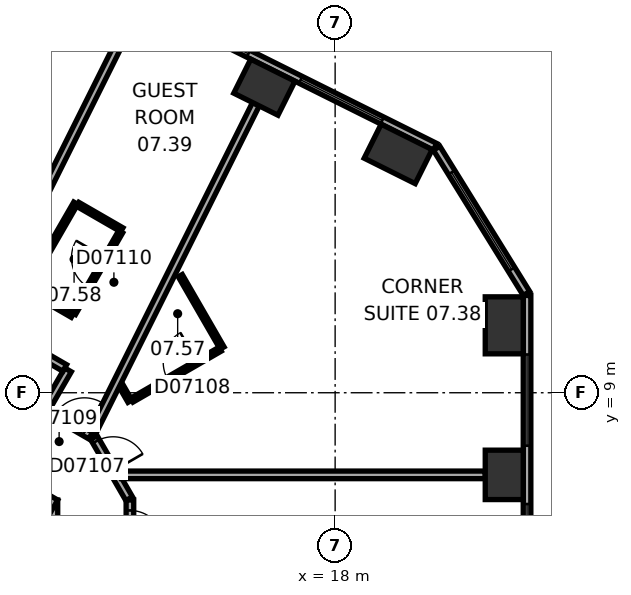
"""IFC4 building model, lengths in metres.
Left out: names, types, materials, properties, quantities, classifications, styles, units other than length and angle.
Written with IfcOpenShell. Run it as: python <this file> out.ifc"""

import sys

from ifc_helpers import new_model, si_unit, direction, frame, frame_2d, origin, origin_2d, place, context, subcontext, project, spatial, rectangle, extrude, element, fill, save


model = new_model("IFC4")
c1 = context("Model", 3, precision=1e-05, world=origin(), true_north=direction((0.0, 1.0)))
c2 = subcontext(c1, "Body", "Model", "MODEL_VIEW")
j1 = project(units=[si_unit("LENGTHUNIT", "METRE"), si_unit("PLANEANGLEUNIT", "RADIAN")], contexts=[c1])
p1 = place(None, origin())
s1 = spatial("IfcSite", under=j1, at=p1, CompositionType="ELEMENT")
p2 = place(p1, origin())
s2 = spatial("IfcBuilding", under=s1, at=p2, CompositionType="ELEMENT")
p3 = place(p2, frame((0.0, 0.0, 44.0)))
s3 = spatial("IfcBuildingStorey", under=s2, at=p3, CompositionType="ELEMENT", Elevation=44.0)
p4 = place(p3, frame((22.45, 6.839, 0.0), z_axis=(0.0, 0.0, 1.0), x_axis=(0.0, 1.0, 0.0)))
e1 = element("IfcColumn", 1, at=p4, inside=s3, PredefinedType="COLUMN", context=c2, shape_type="SweptSolid", body=[
    extrude(rectangle(XDim=1.3, YDim=1.0, at=origin_2d()), origin(), (0.0, 0.0, 1.0), 3.3),
])
for number, where, z_axis, x_axis in (
    (2, (22.45, 10.774, 0.0), (0.0, 0.0, 1.0), (0.0, 1.0, 0.0)),
    (3, (19.659, 15.284, 0.0), (0.0, 0.0, 1.0), (-0.895, 0.446, 0.0)),
):
    element("IfcColumn", number, at=place(p3, frame(where, z_axis=z_axis, x_axis=x_axis)), inside=s3, PredefinedType="COLUMN", context=c2, shape_type="SweptSolid", body=[
        extrude(rectangle(XDim=1.5, YDim=1.0, at=origin_2d()), origin(), (0.0, 0.0, 1.0), 3.3),
    ])
p5 = place(p3, frame((16.138, 17.04, 0.0), z_axis=(0.0, 0.0, 1.0), x_axis=(-0.894934361602, 0.44619781311, 0.0)))
e4 = element("IfcColumn", 4, at=p5, inside=s3, PredefinedType="COLUMN", context=c2, shape_type="SweptSolid", body=[
    extrude(rectangle(XDim=1.3, YDim=1.0, at=origin_2d()), origin(), (0.0, 0.0, 1.0), 3.3),
])
p6 = place(p3, frame((10.1, -6.177, 0.0), z_axis=(0.0, 0.0, 1.0), x_axis=(0.0, 1.0, 0.0)))
e5 = element("IfcWall", 5, at=p6, inside=s3, PredefinedType="SHEAR", context=c2, shape_type="SweptSolid", body=[
    extrude(rectangle(XDim=12.355, YDim=1.2, at=frame_2d((6.177, 0.0))), origin(), (0.0, 0.0, 1.0), 3.3),
])
p7 = place(p6, frame((6.378, 0.0, 0.0)))
e6 = element("IfcOpeningElement", 6, at=p7, cuts=e5, PredefinedType="OPENING", context=c2, shape_type="SweptSolid", body=[
    extrude(rectangle(XDim=1.5, YDim=2.1, at=frame_2d((0.75, 1.05))), frame((0.0, 0.61, 0.0), z_axis=(0.0, -1.0, 0.0), x_axis=(1.0, 0.0, 0.0)), (0.0, 0.0, 1.0), 1.22),
])
p8 = place(p6, frame((1.828, 0.0, 0.0)))
e7 = element("IfcOpeningElement", 7, at=p8, cuts=e5, PredefinedType="OPENING", context=c2, shape_type="SweptSolid", body=[
    extrude(rectangle(XDim=1.1, YDim=2.1, at=frame_2d((0.55, 1.05))), frame((0.0, 0.61, 0.0), z_axis=(0.0, -1.0, 0.0), x_axis=(1.0, 0.0, 0.0)), (0.0, 0.0, 1.0), 1.22),
])
p9 = place(p6, frame((4.427, 0.0, 0.0)))
e8 = element("IfcOpeningElement", 8, at=p9, cuts=e5, PredefinedType="OPENING", context=c2, shape_type="SweptSolid", body=[
    extrude(rectangle(XDim=1.1, YDim=2.1, at=frame_2d((0.55, 1.05))), frame((0.0, 0.61, 0.0), z_axis=(0.0, -1.0, 0.0), x_axis=(1.0, 0.0, 0.0)), (0.0, 0.0, 1.0), 1.22),
])
p10 = place(p3, frame((10.4, 5.658, 0.0), z_axis=(0.0, 0.0, 1.0), x_axis=(-0.866021384402, 0.500006961711, 0.0)))
e9 = element("IfcWall", 9, at=p10, inside=s3, PredefinedType="SHEAR", context=c2, shape_type="SweptSolid", body=[
    extrude(rectangle(XDim=12.355, YDim=1.2, at=frame_2d((6.178, 0.0))), origin(), (0.0, 0.0, 1.0), 3.3),
])
p11 = place(p10, frame((2.728, 0.0, 0.0)))
e10 = element("IfcOpeningElement", 10, at=p11, cuts=e9, PredefinedType="OPENING", context=c2, shape_type="SweptSolid", body=[
    extrude(rectangle(XDim=1.1, YDim=2.1, at=frame_2d((0.55, 1.05))), frame((0.0, 0.61, 0.0), z_axis=(0.0, -1.0, 0.0), x_axis=(1.0, 0.0, 0.0)), (0.0, 0.0, 1.0), 1.22),
])
p12 = place(p10, frame((5.328, 0.0, 0.0)))
e11 = element("IfcOpeningElement", 11, at=p12, cuts=e9, PredefinedType="OPENING", context=c2, shape_type="SweptSolid", body=[
    extrude(rectangle(XDim=1.1, YDim=2.1, at=frame_2d((0.55, 1.05))), frame((0.0, 0.61, 0.0), z_axis=(0.0, -1.0, 0.0), x_axis=(1.0, 0.0, 0.0)), (0.0, 0.0, 1.0), 1.22),
])
p13 = place(p10, frame((7.928, 0.0, 0.0)))
e12 = element("IfcOpeningElement", 12, at=p13, cuts=e9, PredefinedType="OPENING", context=c2, shape_type="SweptSolid", body=[
    extrude(rectangle(XDim=1.1, YDim=2.1, at=frame_2d((0.55, 1.05))), frame((0.0, 0.61, 0.0), z_axis=(0.0, -1.0, 0.0), x_axis=(1.0, 0.0, 0.0)), (0.0, 0.0, 1.0), 1.22),
])
p14 = place(p3, frame((23.05, -9.687, 0.0), z_axis=(0.0, 0.0, 1.0), x_axis=(0.0, 1.0, 0.0)))
e13 = element("IfcWall", 13, at=p14, inside=s3, PredefinedType="STANDARD", context=c2, shape_type="SweptSolid", body=[
    extrude(rectangle(XDim=21.246, YDim=0.2, at=frame_2d((10.623, 0.0))), origin(), (0.0, 0.0, 1.0), 3.3),
])
p15 = place(p14, frame((1.555, 0.0, 0.8)))
e14 = element("IfcOpeningElement", 14, at=p15, cuts=e13, PredefinedType="OPENING", context=c2, shape_type="SweptSolid", body=[
    extrude(rectangle(XDim=2.4, YDim=1.7, at=frame_2d((1.2, 0.85))), frame((0.0, 0.11, 0.0), z_axis=(0.0, -1.0, 0.0), x_axis=(1.0, 0.0, 0.0)), (0.0, 0.0, 1.0), 0.22),
])
p16 = place(p14, frame((5.489, 0.0, 0.8)))
e15 = element("IfcOpeningElement", 15, at=p16, cuts=e13, PredefinedType="OPENING", context=c2, shape_type="SweptSolid", body=[
    extrude(rectangle(XDim=2.4, YDim=1.7, at=frame_2d((1.2, 0.85))), frame((0.0, 0.11, 0.0), z_axis=(0.0, -1.0, 0.0), x_axis=(1.0, 0.0, 0.0)), (0.0, 0.0, 1.0), 0.22),
])
p17 = place(p14, frame((9.424, 0.0, 0.8)))
e16 = element("IfcOpeningElement", 16, at=p17, cuts=e13, PredefinedType="OPENING", context=c2, shape_type="SweptSolid", body=[
    extrude(rectangle(XDim=2.4, YDim=1.7, at=frame_2d((1.2, 0.85))), frame((0.0, 0.11, 0.0), z_axis=(0.0, -1.0, 0.0), x_axis=(1.0, 0.0, 0.0)), (0.0, 0.0, 1.0), 0.22),
])
p18 = place(p14, frame((13.358, 0.0, 0.8)))
e17 = element("IfcOpeningElement", 17, at=p18, cuts=e13, PredefinedType="OPENING", context=c2, shape_type="SweptSolid", body=[
    extrude(rectangle(XDim=2.4, YDim=1.7, at=frame_2d((1.2, 0.85))), frame((0.0, 0.11, 0.0), z_axis=(0.0, -1.0, 0.0), x_axis=(1.0, 0.0, 0.0)), (0.0, 0.0, 1.0), 0.22),
])
p19 = place(p14, frame((17.293, 0.0, 0.8)))
e18 = element("IfcOpeningElement", 18, at=p19, cuts=e13, PredefinedType="OPENING", context=c2, shape_type="SweptSolid", body=[
    extrude(rectangle(XDim=2.4, YDim=1.7, at=frame_2d((1.2, 0.85))), frame((0.0, 0.11, 0.0), z_axis=(0.0, -1.0, 0.0), x_axis=(1.0, 0.0, 0.0)), (0.0, 0.0, 1.0), 0.22),
])
p20 = place(p3, frame((23.035, 11.612, 0.0), z_axis=(0.0, 0.0, 1.0), x_axis=(-0.526160091227, 0.850385535155, 0.0)))
e19 = element("IfcWall", 19, at=p20, inside=s3, PredefinedType="STANDARD", context=c2, shape_type="SweptSolid", body=[
    extrude(rectangle(XDim=4.494, YDim=0.2, at=frame_2d((2.247, 0.0))), origin(), (0.0, 0.0, 1.0), 3.3),
])
p21 = place(p20, frame((0.747, 0.0, 0.8)))
e20 = element("IfcOpeningElement", 20, at=p21, cuts=e19, PredefinedType="OPENING", context=c2, shape_type="SweptSolid", body=[
    extrude(rectangle(XDim=3.0, YDim=1.7, at=frame_2d((1.5, 0.85))), frame((0.0, 0.11, 0.0), z_axis=(0.0, -1.0, 0.0), x_axis=(1.0, 0.0, 0.0)), (0.0, 0.0, 1.0), 0.22),
])
p22 = place(p3, frame((20.63, 15.47, 0.0), z_axis=(0.0, 0.0, 1.0), x_axis=(-0.894934518609, 0.446197498203, 0.0)))
e21 = element("IfcWall", 21, at=p22, inside=s3, PredefinedType="STANDARD", context=c2, shape_type="SweptSolid", body=[
    extrude(rectangle(XDim=21.246, YDim=0.2, at=frame_2d((10.623, 0.0))), origin(), (0.0, 0.0, 1.0), 3.3),
])
p23 = place(p22, frame((1.553, 0.0, 0.8)))
e22 = element("IfcOpeningElement", 22, at=p23, cuts=e21, PredefinedType="OPENING", context=c2, shape_type="SweptSolid", body=[
    extrude(rectangle(XDim=2.4, YDim=1.7, at=frame_2d((1.2, 0.85))), frame((0.0, 0.11, 0.0), z_axis=(0.0, -1.0, 0.0), x_axis=(1.0, 0.0, 0.0)), (0.0, 0.0, 1.0), 0.22),
])
p24 = place(p22, frame((5.488, 0.0, 0.8)))
e23 = element("IfcOpeningElement", 23, at=p24, cuts=e21, PredefinedType="OPENING", context=c2, shape_type="SweptSolid", body=[
    extrude(rectangle(XDim=2.4, YDim=1.7, at=frame_2d((1.2, 0.85))), frame((0.0, 0.11, 0.0), z_axis=(0.0, -1.0, 0.0), x_axis=(1.0, 0.0, 0.0)), (0.0, 0.0, 1.0), 0.22),
])
p25 = place(p22, frame((9.422, 0.0, 0.8)))
e24 = element("IfcOpeningElement", 24, at=p25, cuts=e21, PredefinedType="OPENING", context=c2, shape_type="SweptSolid", body=[
    extrude(rectangle(XDim=2.4, YDim=1.7, at=frame_2d((1.2, 0.85))), frame((0.0, 0.11, 0.0), z_axis=(0.0, -1.0, 0.0), x_axis=(1.0, 0.0, 0.0)), (0.0, 0.0, 1.0), 0.22),
])
p26 = place(p22, frame((13.357, 0.0, 0.8)))
e25 = element("IfcOpeningElement", 25, at=p26, cuts=e21, PredefinedType="OPENING", context=c2, shape_type="SweptSolid", body=[
    extrude(rectangle(XDim=2.4, YDim=1.7, at=frame_2d((1.2, 0.85))), frame((0.0, 0.11, 0.0), z_axis=(0.0, -1.0, 0.0), x_axis=(1.0, 0.0, 0.0)), (0.0, 0.0, 1.0), 0.22),
])
p27 = place(p22, frame((17.292, 0.0, 0.8)))
e26 = element("IfcOpeningElement", 26, at=p27, cuts=e21, PredefinedType="OPENING", context=c2, shape_type="SweptSolid", body=[
    extrude(rectangle(XDim=2.4, YDim=1.7, at=frame_2d((1.2, 0.85))), frame((0.0, 0.11, 0.0), z_axis=(0.0, -1.0, 0.0), x_axis=(1.0, 0.0, 0.0)), (0.0, 0.0, 1.0), 0.22),
])
p28 = place(p3, frame((9.875, 11.736, 0.0), z_axis=(0.0, 0.0, 1.0), x_axis=(0.499936506574, 0.866062058628, 0.0)))
e27 = element("IfcWall", 27, at=p28, inside=s3, PredefinedType="PARTITIONING", context=c2, shape_type="SweptSolid", body=[
    extrude(rectangle(XDim=2.6, YDim=0.12, at=frame_2d((1.3, 0.0))), origin(), (0.0, 0.0, 1.0), 3.05),
])
p29 = place(p3, frame((10.371, 8.561, 0.0), z_axis=(0.0, 0.0, 1.0), x_axis=(0.499986357472, 0.866033280158, 0.0)))
e28 = element("IfcWall", 28, at=p29, inside=s3, PredefinedType="PARTITIONING", context=c2, shape_type="SweptSolid", body=[
    extrude(rectangle(XDim=1.201, YDim=0.2, at=frame_2d((0.601, 0.0))), origin(), (0.0, 0.0, 1.0), 3.05),
])
p30 = place(p3, frame((10.885, 9.652, 0.0), z_axis=(0.0, 0.0, 1.0), x_axis=(-0.866033868542, 0.499985338323, 0.0)))
e29 = element("IfcWall", 29, at=p30, inside=s3, PredefinedType="PARTITIONING", context=c2, shape_type="SweptSolid", body=[
    extrude(rectangle(XDim=8.602, YDim=0.2, at=frame_2d((4.301, 0.0))), origin(), (0.0, 0.0, 1.0), 3.05),
])
p31 = place(p30, frame((5.069, 0.0, 0.0)))
e30 = element("IfcOpeningElement", 30, at=p31, cuts=e29, PredefinedType="OPENING", context=c2, shape_type="SweptSolid", body=[
    extrude(rectangle(XDim=1.0, YDim=2.1, at=frame_2d((0.5, 1.05))), frame((0.0, 0.11, 0.0), z_axis=(0.0, -1.0, 0.0), x_axis=(1.0, 0.0, 0.0)), (0.0, 0.0, 1.0), 0.22),
])
for number, where, z_axis, x_axis in (
    (31, (11.087, 11.036, 0.0), (0.0, 0.0, 1.0), (-0.866, 0.5, 0.0)),
    (32, (11.226, 13.958, 0.0), (0.0, 0.0, 1.0), (0.866, -0.5, 0.0)),
):
    element("IfcWall", number, at=place(p3, frame(where, z_axis=z_axis, x_axis=x_axis)), inside=s3, PredefinedType="PARTITIONING", context=c2, shape_type="SweptSolid", body=[
        extrude(rectangle(XDim=1.34, YDim=0.12, at=frame_2d((0.67, 0.0))), origin(), (0.0, 0.0, 1.0), 3.05),
    ])
p32 = place(p3, frame((11.566, 7.871, 0.0), z_axis=(0.0, 0.0, 1.0), x_axis=(-0.866004557827, 0.500036104519, 0.0)))
e33 = element("IfcWall", 33, at=p32, inside=s3, PredefinedType="PARTITIONING", context=c2, shape_type="SweptSolid", body=[
    extrude(rectangle(XDim=1.28, YDim=0.2, at=frame_2d((0.64, 0.0))), origin(), (0.0, 0.0, 1.0), 3.05),
])
p33 = place(p32, frame((0.19, 0.0, 0.0)))
e34 = element("IfcOpeningElement", 34, at=p33, cuts=e33, PredefinedType="OPENING", context=c2, shape_type="SweptSolid", body=[
    extrude(rectangle(XDim=0.9, YDim=2.1, at=frame_2d((0.45, 1.05))), frame((0.0, 0.11, 0.0), z_axis=(0.0, -1.0, 0.0), x_axis=(1.0, 0.0, 0.0)), (0.0, 0.0, 1.0), 0.22),
])
p34 = place(p3, frame((12.357, 13.236, 0.0), z_axis=(0.0, 0.0, 1.0), x_axis=(-0.50000366821, -0.866023285932, 0.0)))
e35 = element("IfcWall", 35, at=p34, inside=s3, PredefinedType="PARTITIONING", context=c2, shape_type="SweptSolid", body=[
    extrude(rectangle(XDim=2.48, YDim=0.12, at=frame_2d((1.24, 0.0))), origin(), (0.0, 0.0, 1.0), 3.05),
])
p35 = place(p34, frame((0.79, 0.0, 0.0)))
e36 = element("IfcOpeningElement", 36, at=p35, cuts=e35, PredefinedType="OPENING", context=c2, shape_type="SweptSolid", body=[
    extrude(rectangle(XDim=0.9, YDim=2.1, at=frame_2d((0.45, 1.05))), frame((0.0, 0.07, 0.0), z_axis=(0.0, -1.0, 0.0), x_axis=(1.0, 0.0, 0.0)), (0.0, 0.0, 1.0), 0.14),
])
p36 = place(p3, frame((12.393, 18.348, 0.0), z_axis=(0.0, 0.0, 1.0), x_axis=(-0.446176022699, -0.894945225569, 0.0)))
e37 = element("IfcWall", 37, at=p36, inside=s3, PredefinedType="PARTITIONING", context=c2, shape_type="SweptSolid", body=[
    extrude(rectangle(XDim=8.191, YDim=0.2, at=frame_2d((4.095, 0.0))), origin(), (0.0, 0.0, 1.0), 2.6),
])
p37 = place(p3, frame((12.58, 6.212, 0.0), z_axis=(0.0, 0.0, 1.0), x_axis=(-0.500063286585, 0.865988862174, 0.0)))
e38 = element("IfcWall", 38, at=p37, inside=s3, PredefinedType="PARTITIONING", context=c2, shape_type="SweptSolid", body=[
    extrude(rectangle(XDim=1.86, YDim=0.2, at=frame_2d((0.93, 0.0))), origin(), (0.0, 0.0, 1.0), 3.05),
])
p38 = place(p37, frame((0.842, 0.0, 0.0)))
e39 = element("IfcOpeningElement", 39, at=p38, cuts=e38, PredefinedType="OPENING", context=c2, shape_type="SweptSolid", body=[
    extrude(rectangle(XDim=0.9, YDim=2.1, at=frame_2d((0.45, 1.05))), frame((0.0, 0.11, 0.0), z_axis=(0.0, -1.0, 0.0), x_axis=(1.0, 0.0, 0.0)), (0.0, 0.0, 1.0), 0.22),
])
p39 = place(p3, frame((12.6, 3.004, 0.0), z_axis=(0.0, 0.0, 1.0), x_axis=(0.0, 1.0, 0.0)))
e40 = element("IfcWall", 40, at=p39, inside=s3, PredefinedType="PARTITIONING", context=c2, shape_type="SweptSolid", body=[
    extrude(rectangle(XDim=3.173, YDim=0.2, at=frame_2d((1.586, 0.0))), origin(), (0.0, 0.0, 1.0), 3.05),
])
p40 = place(p39, frame((1.998, 0.0, 0.0)))
e41 = element("IfcOpeningElement", 41, at=p40, cuts=e40, PredefinedType="OPENING", context=c2, shape_type="SweptSolid", body=[
    extrude(rectangle(XDim=0.9, YDim=2.1, at=frame_2d((0.45, 1.05))), frame((0.0, 0.11, 0.0), z_axis=(0.0, -1.0, 0.0), x_axis=(1.0, 0.0, 0.0)), (0.0, 0.0, 1.0), 0.22),
])
p41 = place(p3, frame((12.601, 8.776, 0.0), z_axis=(0.0, 0.0, 1.0), x_axis=(-0.500166486798, 0.865929261247, 0.0)))
e42 = element("IfcWall", 42, at=p41, inside=s3, PredefinedType="PARTITIONING", context=c2, shape_type="SweptSolid", body=[
    extrude(rectangle(XDim=0.476, YDim=0.12, at=frame_2d((0.238, 0.0))), origin(), (0.0, 0.0, 1.0), 3.05),
])
p42 = place(p3, frame((13.926, 12.081, 0.0), z_axis=(0.0, 0.0, 1.0), x_axis=(0.499994660107, -0.866028486751, 0.0)))
e43 = element("IfcWall", 43, at=p42, inside=s3, PredefinedType="PARTITIONING", context=c2, shape_type="SweptSolid", body=[
    extrude(rectangle(XDim=2.2, YDim=0.12, at=frame_2d((1.1, 0.0))), origin(), (0.0, 0.0, 1.0), 3.05),
])
p43 = place(p3, frame((14.974, 10.146, 0.0), z_axis=(0.0, 0.0, 1.0), x_axis=(-0.86599746015, -0.500048396672, 0.0)))
e44 = element("IfcWall", 44, at=p43, inside=s3, PredefinedType="PARTITIONING", context=c2, shape_type="SweptSolid", body=[
    extrude(rectangle(XDim=2.68, YDim=0.12, at=frame_2d((1.34, 0.0))), origin(), (0.0, 0.0, 1.0), 3.05),
])
p44 = place(p43, frame((0.69, 0.0, 0.0)))
e45 = element("IfcOpeningElement", 45, at=p44, cuts=e44, PredefinedType="OPENING", context=c2, shape_type="SweptSolid", body=[
    extrude(rectangle(XDim=0.9, YDim=2.1, at=frame_2d((0.45, 1.05))), frame((0.0, 0.07, 0.0), z_axis=(0.0, -1.0, 0.0), x_axis=(1.0, 0.0, 0.0)), (0.0, 0.0, 1.0), 0.14),
])
p45 = place(p3, frame((15.915, 16.592, 0.0), z_axis=(0.0, 0.0, 1.0), x_axis=(-0.446199736347, -0.894933402709, 0.0)))
e46 = element("IfcWall", 46, at=p45, inside=s3, PredefinedType="PARTITIONING", context=c2, shape_type="SweptSolid", body=[
    extrude(rectangle(XDim=9.635, YDim=0.2, at=frame_2d((4.817, 0.0))), origin(), (0.0, 0.0, 1.0), 3.05),
])
p46 = place(p3, frame((21.95, 6.839, 0.0), z_axis=(0.0, 0.0, 1.0), x_axis=(-1.0, 0.0, 0.0)))
e47 = element("IfcWall", 47, at=p46, inside=s3, PredefinedType="PARTITIONING", context=c2, shape_type="SweptSolid", body=[
    extrude(rectangle(XDim=9.572, YDim=0.2, at=frame_2d((4.786, 0.0))), origin(), (0.0, 0.0, 1.0), 3.05),
])
p47 = place(p18, origin())
e48 = element("IfcWindow", 48, at=p47, inside=s3, PartitioningType="SINGLE_PANEL", PredefinedType="WINDOW", context=c2, shape_type="SweptSolid", body=[
    extrude(rectangle(XDim=2.4, YDim=1.7, at=frame_2d((1.2, 0.85))), frame((0.0, 0.03, 0.0), z_axis=(0.0, -1.0, 0.0), x_axis=(1.0, 0.0, 0.0)), (0.0, 0.0, 1.0), 0.06),
])
fill(e17, e48)
p48 = place(p19, origin())
e49 = element("IfcWindow", 49, at=p48, inside=s3, PartitioningType="SINGLE_PANEL", PredefinedType="WINDOW", context=c2, shape_type="SweptSolid", body=[
    extrude(rectangle(XDim=2.4, YDim=1.7, at=frame_2d((1.2, 0.85))), frame((0.0, 0.03, 0.0), z_axis=(0.0, -1.0, 0.0), x_axis=(1.0, 0.0, 0.0)), (0.0, 0.0, 1.0), 0.06),
])
fill(e18, e49)
p49 = place(p21, origin())
e50 = element("IfcWindow", 50, at=p49, inside=s3, PartitioningType="SINGLE_PANEL", PredefinedType="WINDOW", context=c2, shape_type="SweptSolid", body=[
    extrude(rectangle(XDim=3.0, YDim=1.7, at=frame_2d((1.5, 0.85))), frame((0.0, 0.03, 0.0), z_axis=(0.0, -1.0, 0.0), x_axis=(1.0, 0.0, 0.0)), (0.0, 0.0, 1.0), 0.06),
])
fill(e20, e50)
p50 = place(p23, origin())
e51 = element("IfcWindow", 51, at=p50, inside=s3, PartitioningType="SINGLE_PANEL", PredefinedType="WINDOW", context=c2, shape_type="SweptSolid", body=[
    extrude(rectangle(XDim=2.4, YDim=1.7, at=frame_2d((1.2, 0.85))), frame((0.0, 0.03, 0.0), z_axis=(0.0, -1.0, 0.0), x_axis=(1.0, 0.0, 0.0)), (0.0, 0.0, 1.0), 0.06),
])
fill(e22, e51)
p51 = place(p24, origin())
e52 = element("IfcWindow", 52, at=p51, inside=s3, PartitioningType="SINGLE_PANEL", PredefinedType="WINDOW", context=c2, shape_type="SweptSolid", body=[
    extrude(rectangle(XDim=2.4, YDim=1.7, at=frame_2d((1.2, 0.85))), frame((0.0, 0.03, 0.0), z_axis=(0.0, -1.0, 0.0), x_axis=(1.0, 0.0, 0.0)), (0.0, 0.0, 1.0), 0.06),
])
fill(e23, e52)
p52 = place(p40, origin())
e53 = element("IfcDoor", 53, at=p52, inside=s3, OperationType="SINGLE_SWING_LEFT", PredefinedType="DOOR", context=c2, shape_type="SweptSolid", body=[
    extrude(rectangle(XDim=0.9, YDim=2.1, at=frame_2d((0.45, 1.05))), frame((0.0, 0.025, 0.0), z_axis=(0.0, -1.0, 0.0), x_axis=(1.0, 0.0, 0.0)), (0.0, 0.0, 1.0), 0.05),
])
fill(e41, e53)
p53 = place(p38, origin())
e54 = element("IfcDoor", 54, at=p53, inside=s3, OperationType="SINGLE_SWING_LEFT", PredefinedType="DOOR", context=c2, shape_type="SweptSolid", body=[
    extrude(rectangle(XDim=0.9, YDim=2.1, at=frame_2d((0.45, 1.05))), frame((0.0, 0.025, 0.0), z_axis=(0.0, -1.0, 0.0), x_axis=(1.0, 0.0, 0.0)), (0.0, 0.0, 1.0), 0.05),
])
fill(e39, e54)
p54 = place(p44, origin())
e55 = element("IfcDoor", 55, at=p54, inside=s3, OperationType="SINGLE_SWING_LEFT", PredefinedType="DOOR", context=c2, shape_type="SweptSolid", body=[
    extrude(rectangle(XDim=0.9, YDim=2.1, at=frame_2d((0.45, 1.05))), frame((0.0, 0.025, 0.0), z_axis=(0.0, -1.0, 0.0), x_axis=(1.0, 0.0, 0.0)), (0.0, 0.0, 1.0), 0.05),
])
fill(e45, e55)
p55 = place(p33, origin())
e56 = element("IfcDoor", 56, at=p55, inside=s3, OperationType="SINGLE_SWING_LEFT", PredefinedType="DOOR", context=c2, shape_type="SweptSolid", body=[
    extrude(rectangle(XDim=0.9, YDim=2.1, at=frame_2d((0.45, 1.05))), frame((0.0, 0.025, 0.0), z_axis=(0.0, -1.0, 0.0), x_axis=(1.0, 0.0, 0.0)), (0.0, 0.0, 1.0), 0.05),
])
fill(e34, e56)
p56 = place(p35, origin())
e57 = element("IfcDoor", 57, at=p56, inside=s3, OperationType="SINGLE_SWING_LEFT", PredefinedType="DOOR", context=c2, shape_type="SweptSolid", body=[
    extrude(rectangle(XDim=0.9, YDim=2.1, at=frame_2d((0.45, 1.05))), frame((0.0, 0.025, 0.0), z_axis=(0.0, -1.0, 0.0), x_axis=(1.0, 0.0, 0.0)), (0.0, 0.0, 1.0), 0.05),
])
fill(e36, e57)
save(model, sys.argv[1])
